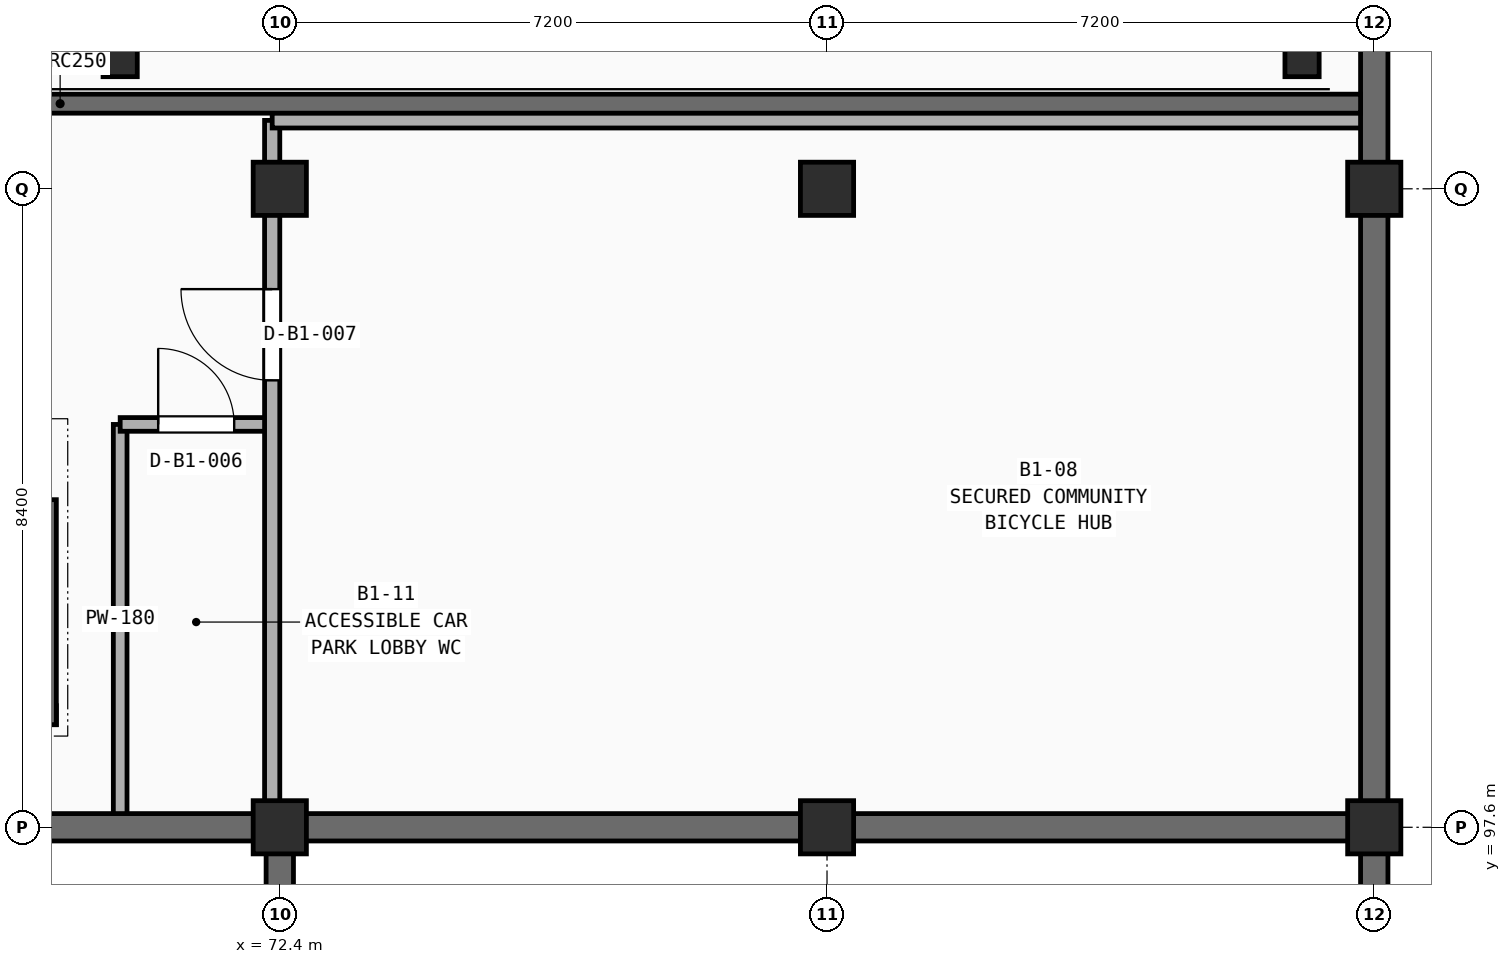
"""IFC4 building model, lengths in metres.
Left out: names, types, materials, properties, quantities, classifications, styles, units other than length and angle.
Written with IfcOpenShell. Run it as: python <this file> out.ifc"""

import sys

from ifc_helpers import new_model, si_unit, direction, frame, frame_2d, origin, origin_2d, place, context, subcontext, project, spatial, rectangle, extrude, element, fill, save


model = new_model("IFC4")
c1 = context("Model", 3, precision=1e-05, world=origin(), true_north=direction((0.0, 1.0)))
c2 = subcontext(c1, "Body", "Model", "MODEL_VIEW")
j1 = project(units=[si_unit("LENGTHUNIT", "METRE"), si_unit("PLANEANGLEUNIT", "RADIAN")], contexts=[c1])
p1 = place(None, origin())
s1 = spatial("IfcSite", under=j1, at=p1, CompositionType="ELEMENT")
p2 = place(p1, origin())
s2 = spatial("IfcBuilding", under=s1, at=p2, CompositionType="ELEMENT")
p3 = place(p2, frame((0.0, 0.0, -4.2)))
s3 = spatial("IfcBuildingStorey", under=s2, at=p3, CompositionType="ELEMENT", Elevation=-4.2)
for number, where, z_axis, x_axis in (
    (1, (72.4, 97.6, 0.0), (0.0, 0.0, 1.0), (1.0, 0.0, 0.0)),
    (2, (72.4, 106.0, 0.0), (0.0, 0.0, 1.0), (1.0, 0.0, 0.0)),
    (3, (79.6, 97.6, 0.0), (0.0, 0.0, 1.0), (1.0, 0.0, 0.0)),
    (4, (79.6, 106.0, 0.0), (0.0, 0.0, 1.0), (1.0, 0.0, 0.0)),
    (5, (86.8, 97.6, 0.0), (0.0, 0.0, 1.0), (1.0, 0.0, 0.0)),
    (6, (86.8, 106.0, 0.0), (0.0, 0.0, 1.0), (1.0, 0.0, 0.0)),
):
    element("IfcColumn", number, at=place(p3, frame(where, z_axis=z_axis, x_axis=x_axis)), inside=s3, PredefinedType="COLUMN", context=c2, shape_type="SweptSolid", body=[
        extrude(rectangle(XDim=0.7, YDim=0.7, at=origin_2d()), origin(), (0.0, 0.0, 1.0), 4.2),
    ])
p4 = place(p3, frame((70.3, 97.77, 0.0), z_axis=(0.0, 0.0, 1.0), x_axis=(0.0, 1.0, 0.0)))
e7 = element("IfcWall", 7, at=p4, inside=s3, PredefinedType="PARTITIONING", context=c2, shape_type="SweptSolid", body=[
    extrude(rectangle(XDim=5.13, YDim=0.18, at=frame_2d((2.565, 0.0))), origin(), (0.0, 0.0, 1.0), 3.54),
])
p5 = place(p3, frame((70.3, 102.9, 0.0), z_axis=(0.0, 0.0, 1.0), x_axis=(1.0, 0.0, 0.0)))
e8 = element("IfcWall", 8, at=p5, inside=s3, PredefinedType="PARTITIONING", context=c2, shape_type="SweptSolid", body=[
    extrude(rectangle(XDim=2.0, YDim=0.18, at=frame_2d((1.0, 0.0))), origin(), (0.0, 0.0, 1.0), 3.54),
])
p6 = place(p5, frame((0.5, 0.0, -0.01)))
e9 = element("IfcOpeningElement", 9, at=p6, cuts=e8, PredefinedType="OPENING", context=c2, shape_type="SweptSolid", body=[
    extrude(rectangle(XDim=1.0, YDim=2.16, at=frame_2d((0.5, 1.08))), frame((0.0, 0.1, 0.0), z_axis=(0.0, -1.0, 0.0), x_axis=(1.0, 0.0, 0.0)), (0.0, 0.0, 1.0), 0.2),
])
p7 = place(p3, frame((72.3, 97.77, 0.0), z_axis=(0.0, 0.0, 1.0), x_axis=(0.0, 1.0, 0.0)))
e10 = element("IfcWall", 10, at=p7, inside=s3, PredefinedType="PARTITIONING", context=c2, shape_type="SweptSolid", body=[
    extrude(rectangle(XDim=9.13, YDim=0.2, at=frame_2d((4.565, 0.0))), origin(), (0.0, 0.0, 1.0), 3.44),
])
p8 = place(p7, frame((5.71, 0.0, -0.01)))
e11 = element("IfcOpeningElement", 11, at=p8, cuts=e10, PredefinedType="OPENING", context=c2, shape_type="SweptSolid", body=[
    extrude(rectangle(XDim=1.2, YDim=2.21, at=frame_2d((0.6, 1.105))), frame((0.0, 0.11, 0.0), z_axis=(0.0, -1.0, 0.0), x_axis=(1.0, 0.0, 0.0)), (0.0, 0.0, 1.0), 0.22),
])
p9 = place(p3, frame((72.3, 106.9, 0.0), z_axis=(0.0, 0.0, 1.0), x_axis=(1.0, 0.0, 0.0)))
e12 = element("IfcWall", 12, at=p9, inside=s3, PredefinedType="PARTITIONING", context=c2, shape_type="SweptSolid", body=[
    extrude(rectangle(XDim=14.33, YDim=0.2, at=frame_2d((7.165, 0.0))), origin(), (0.0, 0.0, 1.0), 3.54),
])
p10 = place(p3, frame((65.2, 97.6, 0.0), z_axis=(0.0, 0.0, 1.0), x_axis=(1.0, 0.0, 0.0)))
e13 = element("IfcWall", 13, at=p10, inside=s3, PredefinedType="SOLIDWALL", context=c2, shape_type="SweptSolid", body=[
    extrude(rectangle(XDim=7.2, YDim=0.36, at=frame_2d((3.6, 0.0))), origin(), (0.0, 0.0, 1.0), 3.54),
])
p11 = place(p3, frame((72.4, 97.6, 0.0), z_axis=(0.0, 0.0, 1.0), x_axis=(1.0, 0.0, 0.0)))
e14 = element("IfcWall", 14, at=p11, inside=s3, PredefinedType="SOLIDWALL", context=c2, shape_type="SweptSolid", body=[
    extrude(rectangle(XDim=7.2, YDim=0.36, at=frame_2d((3.6, 0.0))), origin(), (0.0, 0.0, 1.0), 3.54),
])
p12 = place(p3, frame((79.6, 97.6, 0.0), z_axis=(0.0, 0.0, 1.0), x_axis=(1.0, 0.0, 0.0)))
e15 = element("IfcWall", 15, at=p12, inside=s3, PredefinedType="SOLIDWALL", context=c2, shape_type="SweptSolid", body=[
    extrude(rectangle(XDim=7.2, YDim=0.36, at=frame_2d((3.6, 0.0))), origin(), (0.0, 0.0, 1.0), 3.54),
])
p13 = place(p3, frame((86.8, 97.6, 0.0), z_axis=(0.0, 0.0, 1.0), x_axis=(0.0, 1.0, 0.0)))
e16 = element("IfcWall", 16, at=p13, inside=s3, PredefinedType="SOLIDWALL", context=c2, shape_type="SweptSolid", body=[
    extrude(rectangle(XDim=8.4, YDim=0.36, at=frame_2d((4.2, 0.0))), origin(), (0.0, 0.0, 1.0), 3.44),
])
p14 = place(p3, frame((86.8, 106.0, 0.0), z_axis=(0.0, 0.0, 1.0), x_axis=(0.0, 1.0, 0.0)))
e17 = element("IfcWall", 17, at=p14, inside=s3, PredefinedType="SOLIDWALL", context=c2, shape_type="SweptSolid", body=[
    extrude(rectangle(XDim=9.0, YDim=0.36, at=frame_2d((4.5, 0.0))), origin(), (0.0, 0.0, 1.0), 3.44),
])
for number, where, z_axis, x_axis in (
    (18, (72.4, 89.2, -0.4), (0.0, 0.0, 1.0), (0.0, 1.0, 0.0)),
    (19, (86.8, 89.2, -0.4), (0.0, 0.0, 1.0), (0.0, 1.0, 0.0)),
):
    element("IfcWall", number, at=place(p3, frame(where, z_axis=z_axis, x_axis=x_axis)), inside=s3, PredefinedType="SOLIDWALL", context=c2, shape_type="SweptSolid", body=[
        extrude(rectangle(XDim=8.4, YDim=0.36, at=frame_2d((4.2, 0.0))), origin(), (0.0, 0.0, 1.0), 3.84),
    ])
p15 = place(p3, frame((67.25, 99.075, 0.0), z_axis=(0.0, 0.0, 1.0), x_axis=(1.0, 0.0, 0.0)))
e20 = element("IfcWall", 20, at=p15, inside=s3, PredefinedType="SHEAR", context=c2, shape_type="SweptSolid", body=[
    extrude(rectangle(XDim=2.21, YDim=0.25, at=frame_2d((1.105, 0.0))), origin(), (0.0, 0.0, 1.0), 4.2),
])
p16 = place(p3, frame((69.335, 98.95, 0.0), z_axis=(0.0, 0.0, 1.0), x_axis=(0.0, 1.0, 0.0)))
e21 = element("IfcWall", 21, at=p16, inside=s3, PredefinedType="SHEAR", context=c2, shape_type="SweptSolid", body=[
    extrude(rectangle(XDim=2.96, YDim=0.25, at=frame_2d((1.48, 0.0))), origin(), (0.0, 0.0, 1.0), 4.2),
])
p17 = place(p3, frame((70.3, 107.7, 0.0), z_axis=(0.0, 0.0, 1.0), x_axis=(1.0, 0.0, 0.0)))
e22 = element("IfcColumn", 22, at=p17, inside=s3, PredefinedType="COLUMN", context=c2, shape_type="SweptSolid", body=[
    extrude(rectangle(XDim=0.45, YDim=0.45, at=origin_2d()), origin(), (0.0, 0.0, 1.0), 1.8),
])
p18 = place(p3, frame((85.85, 107.7, 0.0), z_axis=(0.0, 0.0, 1.0), x_axis=(1.0, 0.0, 0.0)))
e23 = element("IfcColumn", 23, at=p18, inside=s3, PredefinedType="COLUMN", context=c2, shape_type="SweptSolid", body=[
    extrude(rectangle(XDim=0.45, YDim=0.45, at=origin_2d()), origin(), (0.0, 0.0, 1.0), 3.88),
])
p19 = place(p3, frame((52.4, 107.12, 0.0), z_axis=(0.0, 0.0, 1.0), x_axis=(1.0, 0.0, 0.0)))
e24 = element("IfcWall", 24, at=p19, inside=s3, PredefinedType="SHEAR", context=c2, shape_type="SweptSolid", body=[
    extrude(rectangle(XDim=34.22, YDim=0.25, at=frame_2d((17.11, 0.0))), origin(), (0.0, 0.0, 1.0), 3.88),
])
p20 = place(p6, frame((1.0, 0.0, 0.01), z_axis=(0.0, 0.0, 1.0), x_axis=(-1.0, 0.0, 0.0)))
e25 = element("IfcDoor", 25, at=p20, inside=s3, OperationType="SINGLE_SWING_LEFT", PredefinedType="DOOR", context=c2, shape_type="SweptSolid", body=[
    extrude(rectangle(XDim=1.0, YDim=2.15, at=frame_2d((0.5, 1.075))), frame((0.0, 0.025, 0.0), z_axis=(0.0, -1.0, 0.0), x_axis=(1.0, 0.0, 0.0)), (0.0, 0.0, 1.0), 0.05),
])
fill(e9, e25)
p21 = place(p8, frame((0.0, 0.0, 0.01)))
e26 = element("IfcDoor", 26, at=p21, inside=s3, OperationType="SINGLE_SWING_RIGHT", PredefinedType="DOOR", context=c2, shape_type="SweptSolid", body=[
    extrude(rectangle(XDim=1.2, YDim=2.2, at=frame_2d((0.6, 1.1))), frame((0.0, 0.025, 0.0), z_axis=(0.0, -1.0, 0.0), x_axis=(1.0, 0.0, 0.0)), (0.0, 0.0, 1.0), 0.05),
])
fill(e11, e26)
save(model, sys.argv[1])
